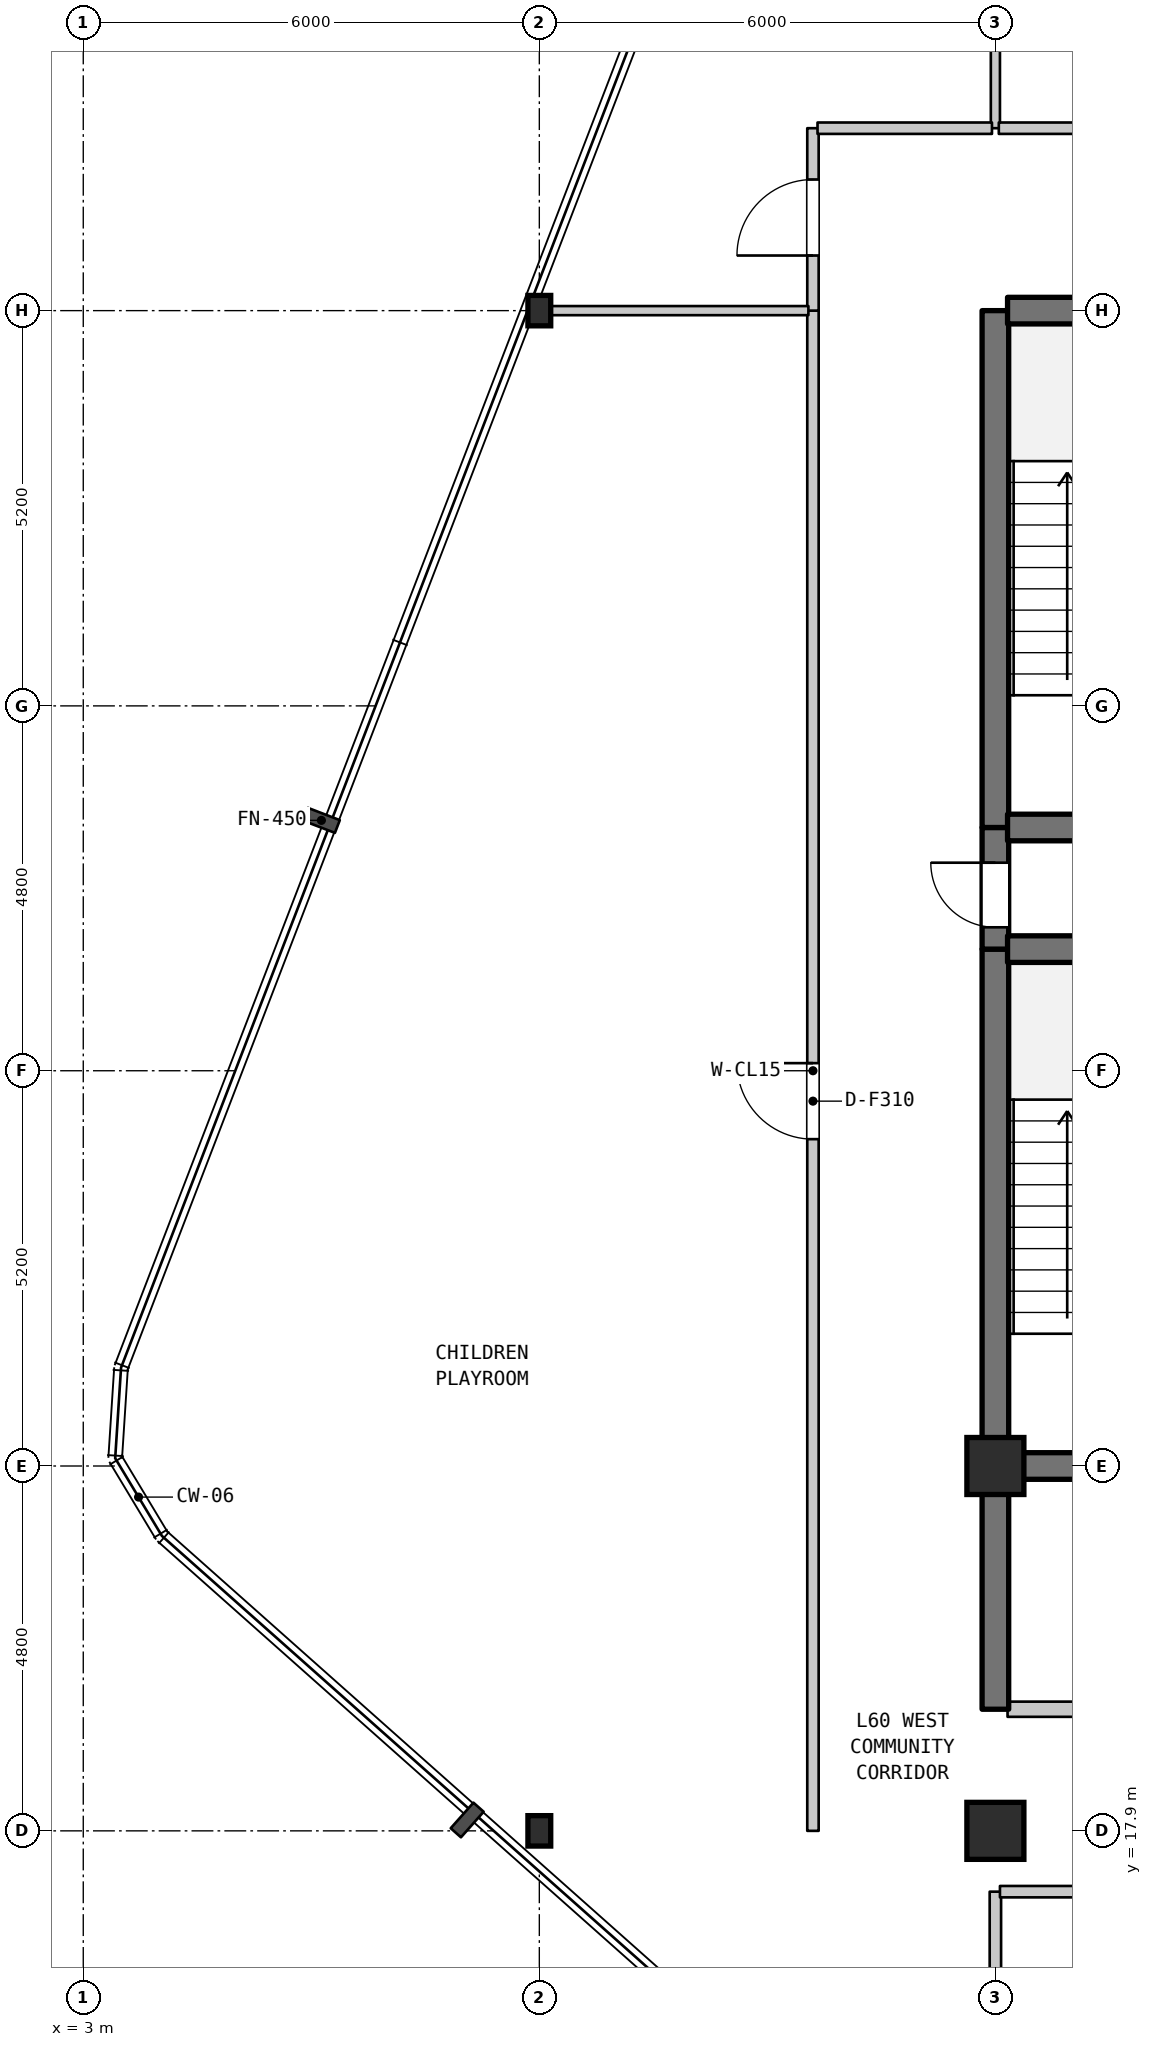
"""IFC4 building model, lengths in metres.
Left out: names, types, materials, properties, quantities, classifications, styles, units other than length and angle.
Written with IfcOpenShell. Run it as: python <this file> out.ifc"""

import sys

from ifc_helpers import new_model, si_unit, direction, frame, frame_2d, origin, origin_2d, place, context, subcontext, project, spatial, rectangle, i_section, extrude, element, fill, save


model = new_model("IFC4")
c1 = context("Model", 3, precision=1e-05, world=origin(), true_north=direction((0.0, 1.0)))
c2 = subcontext(c1, "Body", "Model", "MODEL_VIEW")
j1 = project(units=[si_unit("LENGTHUNIT", "METRE"), si_unit("PLANEANGLEUNIT", "RADIAN")], contexts=[c1])
p1 = place(None, origin())
s1 = spatial("IfcSite", under=j1, at=p1, CompositionType="ELEMENT")
p2 = place(p1, origin())
s2 = spatial("IfcBuilding", under=s1, at=p2, CompositionType="ELEMENT")
p3 = place(p2, frame((0.0, 0.0, 242.8)))
s3 = spatial("IfcBuildingStorey", under=s2, at=p3, CompositionType="ELEMENT", Elevation=242.8)
for number, where, z_axis, x_axis in (
    (1, (9.0, 17.9, 0.0), (0.0, 0.0, 1.0), (1.0, 0.0, 0.0)),
    (2, (9.0, 37.9, 0.0), (0.0, 0.0, 1.0), (1.0, 0.0, 0.0)),
):
    element("IfcColumn", number, at=place(p3, frame(where, z_axis=z_axis, x_axis=x_axis)), inside=s3, PredefinedType="COLUMN", context=c2, shape_type="SweptSolid", body=[
        extrude(i_section(OverallWidth=0.3, OverallDepth=0.4, WebThickness=0.013, FlangeThickness=0.024, FilletRadius=0.027, at=origin_2d()), origin(), (0.0, 0.0, 1.0), 4.5),
    ])
for number, where, z_axis, x_axis in (
    (3, (15.0, 17.9, 0.0), (0.0, 0.0, 1.0), (1.0, 0.0, 0.0)),
    (4, (15.0, 22.7, 0.0), (0.0, 0.0, 1.0), (1.0, 0.0, 0.0)),
):
    element("IfcColumn", number, at=place(p3, frame(where, z_axis=z_axis, x_axis=x_axis)), inside=s3, PredefinedType="COLUMN", context=c2, shape_type="SweptSolid", body=[
        extrude(rectangle(XDim=0.75, YDim=0.75, at=origin_2d()), origin(), (0.0, 0.0, 1.0), 4.5),
    ])
p4 = place(p3, frame((12.6, 17.9, 0.0), z_axis=(0.0, 0.0, 1.0), x_axis=(0.0, 1.0, 0.0)))
e5 = element("IfcWall", 5, at=p4, inside=s3, PredefinedType="STANDARD", context=c2, shape_type="SweptSolid", body=[
    extrude(rectangle(XDim=20.0, YDim=0.15, at=frame_2d((10.0, 0.0))), origin(), (0.0, 0.0, 1.0), 4.19),
])
p5 = place(p4, frame((9.1, 0.0, 0.0)))
e6 = element("IfcOpeningElement", 6, at=p5, cuts=e5, PredefinedType="OPENING", context=c2, shape_type="SweptSolid", body=[
    extrude(rectangle(XDim=1.0, YDim=2.15, at=frame_2d((0.5, 1.075))), frame((0.0, 0.085, 0.0), z_axis=(0.0, -1.0, 0.0), x_axis=(1.0, 0.0, 0.0)), (0.0, 0.0, 1.0), 0.17),
])
p6 = place(p3, frame((12.6, 37.9, 0.0), z_axis=(0.0, 0.0, 1.0), x_axis=(0.0, 1.0, 0.0)))
e7 = element("IfcWall", 7, at=p6, inside=s3, PredefinedType="STANDARD", context=c2, shape_type="SweptSolid", body=[
    extrude(rectangle(XDim=2.4, YDim=0.15, at=frame_2d((1.2, 0.0))), origin(), (0.0, 0.0, 1.0), 4.19),
])
p7 = place(p6, frame((0.725, 0.0, 0.0)))
e8 = element("IfcOpeningElement", 8, at=p7, cuts=e7, PredefinedType="OPENING", context=c2, shape_type="SweptSolid", body=[
    extrude(rectangle(XDim=1.0, YDim=2.15, at=frame_2d((0.5, 1.075))), frame((0.0, 0.085, 0.0), z_axis=(0.0, -1.0, 0.0), x_axis=(1.0, 0.0, 0.0)), (0.0, 0.0, 1.0), 0.17),
])
p8 = place(p3, frame((15.0, 13.0, 0.0), z_axis=(0.0, 0.0, 1.0), x_axis=(0.0, 1.0, 0.0)))
e9 = element("IfcWall", 9, at=p8, inside=s3, PredefinedType="STANDARD", context=c2, shape_type="SweptSolid", body=[
    extrude(rectangle(XDim=4.1, YDim=0.15, at=frame_2d((2.05, 0.0))), origin(), (0.0, 0.0, 1.0), 3.9),
])
p9 = place(p3, frame((15.0, 19.5, 0.0), z_axis=(0.0, 0.0, 1.0), x_axis=(0.0, 1.0, 0.0)))
e10 = element("IfcWall", 10, at=p9, inside=s3, PredefinedType="SHEAR", context=c2, shape_type="SweptSolid", body=[
    extrude(rectangle(XDim=3.2, YDim=0.35, at=frame_2d((1.6, 0.0))), origin(), (0.0, 0.0, 1.0), 4.19),
])
p10 = place(p3, frame((15.0, 22.7, 0.0), z_axis=(0.0, 0.0, 1.0), x_axis=(0.0, 1.0, 0.0)))
e11 = element("IfcWall", 11, at=p10, inside=s3, PredefinedType="SHEAR", context=c2, shape_type="SweptSolid", body=[
    extrude(rectangle(XDim=6.8, YDim=0.35, at=frame_2d((3.4, 0.0))), origin(), (0.0, 0.0, 1.0), 4.19),
])
p11 = place(p3, frame((15.0, 29.5, 0.0), z_axis=(0.0, 0.0, 1.0), x_axis=(0.0, 1.0, 0.0)))
e12 = element("IfcWall", 12, at=p11, inside=s3, PredefinedType="SHEAR", context=c2, shape_type="SweptSolid", body=[
    extrude(rectangle(XDim=1.6, YDim=0.35, at=frame_2d((0.8, 0.0))), origin(), (0.0, 0.0, 1.0), 4.19),
])
p12 = place(p11, frame((0.287, 0.0, 0.0)))
e13 = element("IfcOpeningElement", 13, at=p12, cuts=e12, PredefinedType="OPENING", context=c2, shape_type="SweptSolid", body=[
    extrude(rectangle(XDim=0.85, YDim=2.1, at=frame_2d((0.425, 1.05))), frame((0.0, 0.185, 0.0), z_axis=(0.0, -1.0, 0.0), x_axis=(1.0, 0.0, 0.0)), (0.0, 0.0, 1.0), 0.37),
])
p13 = place(p3, frame((15.0, 31.1, 0.0), z_axis=(0.0, 0.0, 1.0), x_axis=(0.0, 1.0, 0.0)))
e14 = element("IfcWall", 14, at=p13, inside=s3, PredefinedType="SHEAR", context=c2, shape_type="SweptSolid", body=[
    extrude(rectangle(XDim=6.8, YDim=0.35, at=frame_2d((3.4, 0.0))), origin(), (0.0, 0.0, 1.0), 4.19),
])
p14 = place(p3, frame((15.0, 40.3, 0.0), z_axis=(0.0, 0.0, 1.0), x_axis=(0.0, 1.0, 0.0)))
e15 = element("IfcWall", 15, at=p14, inside=s3, PredefinedType="PARTITIONING", context=c2, shape_type="SweptSolid", body=[
    extrude(rectangle(XDim=12.933, YDim=0.12, at=frame_2d((6.466, 0.0))), origin(), (0.0, 0.0, 1.0), 4.19),
])
p15 = place(p3, frame((15.06, 17.1, 0.0), z_axis=(0.0, 0.0, 1.0), x_axis=(1.0, 0.0, 0.0)))
e16 = element("IfcWall", 16, at=p15, inside=s3, PredefinedType="STANDARD", context=c2, shape_type="SweptSolid", body=[
    extrude(rectangle(XDim=8.295, YDim=0.15, at=frame_2d((4.147, 0.0))), origin(), (0.0, 0.0, 1.0), 4.19),
])
p16 = place(p15, frame((1.595, 0.0, 0.0)))
e17 = element("IfcOpeningElement", 17, at=p16, cuts=e16, PredefinedType="OPENING", context=c2, shape_type="SweptSolid", body=[
    extrude(rectangle(XDim=0.9, YDim=2.1, at=frame_2d((0.45, 1.05))), frame((0.0, 0.085, 0.0), z_axis=(0.0, -1.0, 0.0), x_axis=(1.0, 0.0, 0.0)), (0.0, 0.0, 1.0), 0.17),
])
p17 = place(p15, frame((5.645, 0.0, 0.0)))
e18 = element("IfcOpeningElement", 18, at=p17, cuts=e16, PredefinedType="OPENING", context=c2, shape_type="SweptSolid", body=[
    extrude(rectangle(XDim=0.9, YDim=2.1, at=frame_2d((0.45, 1.05))), frame((0.0, 0.085, 0.0), z_axis=(0.0, -1.0, 0.0), x_axis=(1.0, 0.0, 0.0)), (0.0, 0.0, 1.0), 0.17),
])
p18 = place(p3, frame((15.16, 19.5, 0.0), z_axis=(0.0, 0.0, 1.0), x_axis=(1.0, 0.0, 0.0)))
e19 = element("IfcWall", 19, at=p18, inside=s3, PredefinedType="STANDARD", context=c2, shape_type="SweptSolid", body=[
    extrude(rectangle(XDim=3.68, YDim=0.2, at=frame_2d((1.84, 0.0))), origin(), (0.0, 0.0, 1.0), 4.19),
])
p19 = place(p18, frame((1.39, 0.0, 0.0)))
e20 = element("IfcOpeningElement", 20, at=p19, cuts=e19, PredefinedType="OPENING", context=c2, shape_type="SweptSolid", body=[
    extrude(rectangle(XDim=0.9, YDim=2.15, at=frame_2d((0.45, 1.075))), frame((0.0, 0.11, 0.0), z_axis=(0.0, -1.0, 0.0), x_axis=(1.0, 0.0, 0.0)), (0.0, 0.0, 1.0), 0.22),
])
for number, where, z_axis, x_axis in (
    (21, (15.16, 22.7, 0.0), (0.0, 0.0, 1.0), (1.0, 0.0, 0.0)),
    (22, (15.16, 29.5, 0.0), (0.0, 0.0, 1.0), (1.0, 0.0, 0.0)),
    (23, (15.16, 31.1, 0.0), (0.0, 0.0, 1.0), (1.0, 0.0, 0.0)),
):
    element("IfcWall", number, at=place(p3, frame(where, z_axis=z_axis, x_axis=x_axis)), inside=s3, PredefinedType="SHEAR", context=c2, shape_type="SweptSolid", body=[
        extrude(rectangle(XDim=3.68, YDim=0.35, at=frame_2d((1.84, 0.0))), origin(), (0.0, 0.0, 1.0), 4.19),
    ])
p20 = place(p3, frame((8.856, 37.9, 0.0), z_axis=(0.0, 0.0, 1.0), x_axis=(1.0, 0.0, 0.0)))
e24 = element("IfcWall", 24, at=p20, inside=s3, PredefinedType="PARTITIONING", context=c2, shape_type="SweptSolid", body=[
    extrude(rectangle(XDim=3.684, YDim=0.12, at=frame_2d((1.842, 0.0))), origin(), (0.0, 0.0, 1.0), 3.84),
])
p21 = place(p3, frame((15.16, 37.9, 0.0), z_axis=(0.0, 0.0, 1.0), x_axis=(1.0, 0.0, 0.0)))
e25 = element("IfcWall", 25, at=p21, inside=s3, PredefinedType="SHEAR", context=c2, shape_type="SweptSolid", body=[
    extrude(rectangle(XDim=3.68, YDim=0.35, at=frame_2d((1.84, 0.0))), origin(), (0.0, 0.0, 1.0), 4.19),
])
p22 = place(p3, frame((12.66, 40.3, 0.0), z_axis=(0.0, 0.0, 1.0), x_axis=(1.0, 0.0, 0.0)))
e26 = element("IfcWall", 26, at=p22, inside=s3, PredefinedType="STANDARD", context=c2, shape_type="SweptSolid", body=[
    extrude(rectangle(XDim=2.295, YDim=0.15, at=frame_2d((1.147, 0.0))), origin(), (0.0, 0.0, 1.0), 4.19),
])
p23 = place(p3, frame((15.045, 40.3, 0.0), z_axis=(0.0, 0.0, 1.0), x_axis=(1.0, 0.0, 0.0)))
e27 = element("IfcWall", 27, at=p23, inside=s3, PredefinedType="STANDARD", context=c2, shape_type="SweptSolid", body=[
    extrude(rectangle(XDim=17.895, YDim=0.15, at=frame_2d((8.948, 0.0))), origin(), (0.0, 0.0, 1.0), 4.19),
])
p24 = place(p23, frame((9.205, 0.0, 0.0)))
e28 = element("IfcOpeningElement", 28, at=p24, cuts=e27, PredefinedType="OPENING", context=c2, shape_type="SweptSolid", body=[
    extrude(rectangle(XDim=1.0, YDim=2.15, at=frame_2d((0.5, 1.075))), frame((0.0, 0.085, 0.0), z_axis=(0.0, -1.0, 0.0), x_axis=(1.0, 0.0, 0.0)), (0.0, 0.0, 1.0), 0.17),
])
p25 = place(p5, origin())
e29 = element("IfcDoor", 29, at=p25, inside=s3, OperationType="SINGLE_SWING_RIGHT", PredefinedType="DOOR", context=c2, shape_type="SweptSolid", body=[
    extrude(rectangle(XDim=1.0, YDim=2.15, at=frame_2d((0.5, 1.075))), frame((0.0, 0.025, 0.0), z_axis=(0.0, -1.0, 0.0), x_axis=(1.0, 0.0, 0.0)), (0.0, 0.0, 1.0), 0.05),
])
fill(e6, e29)
p26 = place(p7, origin())
e30 = element("IfcDoor", 30, at=p26, inside=s3, OperationType="SINGLE_SWING_LEFT", PredefinedType="DOOR", context=c2, shape_type="SweptSolid", body=[
    extrude(rectangle(XDim=1.0, YDim=2.15, at=frame_2d((0.5, 1.075))), frame((0.0, 0.025, 0.0), z_axis=(0.0, -1.0, 0.0), x_axis=(1.0, 0.0, 0.0)), (0.0, 0.0, 1.0), 0.05),
])
fill(e8, e30)
p27 = place(p12, origin())
e31 = element("IfcDoor", 31, at=p27, inside=s3, OperationType="SINGLE_SWING_RIGHT", PredefinedType="DOOR", context=c2, shape_type="SweptSolid", body=[
    extrude(rectangle(XDim=0.85, YDim=2.1, at=frame_2d((0.425, 1.05))), frame((0.0, 0.025, 0.0), z_axis=(0.0, -1.0, 0.0), x_axis=(1.0, 0.0, 0.0)), (0.0, 0.0, 1.0), 0.05),
])
fill(e13, e31)
save(model, sys.argv[1])
